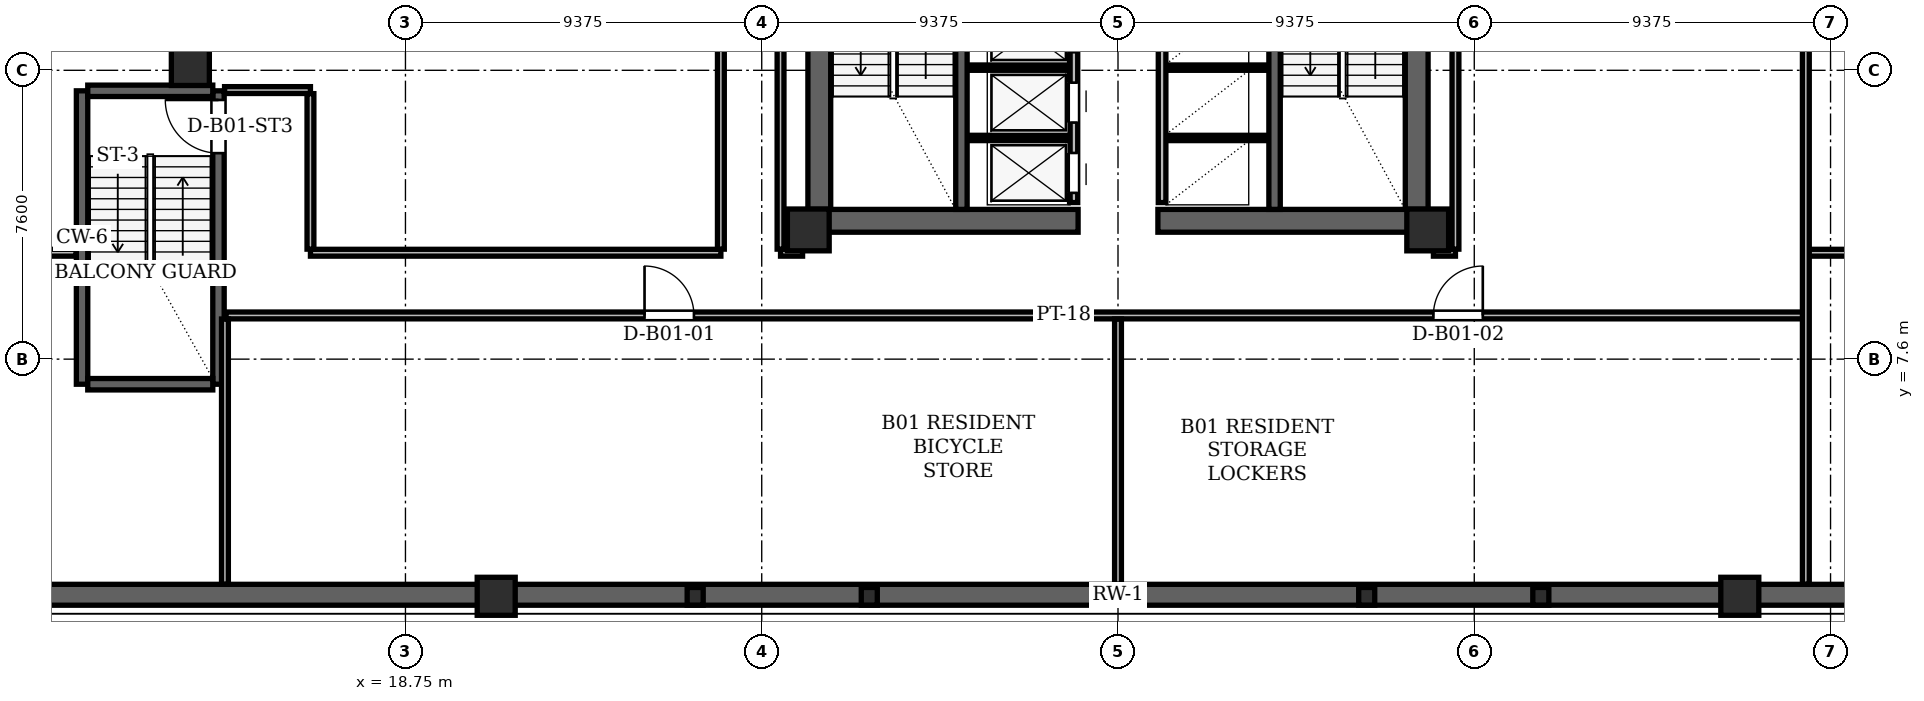
"""IFC4 building model, lengths in metres.
Left out: names, types, materials, properties, quantities, classifications, styles, units other than length and angle.
Written with IfcOpenShell. Run it as: python <this file> out.ifc"""

import sys

from ifc_helpers import new_model, si_unit, direction, frame, frame_2d, origin, origin_2d, place, context, subcontext, project, spatial, rectangle, hollow_rectangle, i_section, extrude, element, fill, save


model = new_model("IFC4")
c1 = context("Model", 3, precision=1e-05, world=origin(), true_north=direction((0.0, 1.0)))
c2 = subcontext(c1, "Body", "Model", "MODEL_VIEW")
j1 = project(units=[si_unit("LENGTHUNIT", "METRE"), si_unit("PLANEANGLEUNIT", "RADIAN")], contexts=[c1])
p1 = place(None, origin())
s1 = spatial("IfcSite", under=j1, at=p1, CompositionType="ELEMENT")
p2 = place(p1, origin())
s2 = spatial("IfcBuilding", under=s1, at=p2, CompositionType="ELEMENT")
p3 = place(p2, frame((0.0, 0.0, -4.0)))
s3 = spatial("IfcBuildingStorey", under=s2, at=p3, CompositionType="ELEMENT", Elevation=-4.0)
for number, where, z_axis, x_axis in (
    (1, (29.35, 11.0, 0.0), (0.0, 0.0, 1.0), (1.0, 0.0, 0.0)),
    (2, (45.65, 11.0, 0.0), (0.0, 0.0, 1.0), (1.0, 0.0, 0.0)),
):
    element("IfcColumn", number, at=place(p3, frame(where, z_axis=z_axis, x_axis=x_axis)), inside=s3, PredefinedType="COLUMN", context=c2, shape_type="SweptSolid", body=[
        extrude(hollow_rectangle(XDim=1.1, YDim=1.1, WallThickness=0.09, at=origin_2d()), origin(), (0.0, 0.0, 1.0), 4.0),
    ])
for number, where, z_axis, x_axis in (
    (3, (13.09, 15.3, 0.004), (0.0, 0.0, 1.0), (1.0, 0.0, 0.0)),
    (4, (21.138, 1.36, 0.004), (0.0, 0.0, 1.0), (1.0, 0.0, 0.0)),
    (5, (53.862, 1.36, 0.004), (0.0, 0.0, 1.0), (1.0, 0.0, 0.0)),
):
    element("IfcColumn", number, at=place(p3, frame(where, z_axis=z_axis, x_axis=x_axis)), inside=s3, PredefinedType="COLUMN", context=c2, shape_type="SweptSolid", body=[
        extrude(hollow_rectangle(XDim=1.0, YDim=1.0, WallThickness=0.085, at=origin_2d()), origin(), (0.0, 0.0, 1.0), 3.991),
    ])
for number, where, z_axis, x_axis in (
    (6, (26.374, 1.36, 0.004), (0.0, 0.0, 1.0), (1.0, 0.0, 0.0)),
    (7, (30.955, 1.36, 0.004), (0.0, 0.0, 1.0), (1.0, 0.0, 0.0)),
    (8, (44.045, 1.36, 0.004), (0.0, 0.0, 1.0), (1.0, 0.0, 0.0)),
    (9, (48.626, 1.36, 0.004), (0.0, 0.0, 1.0), (1.0, 0.0, 0.0)),
):
    element("IfcColumn", number, at=place(p3, frame(where, z_axis=z_axis, x_axis=x_axis)), inside=s3, PredefinedType="COLUMN", context=c2, shape_type="SweptSolid", body=[
        extrude(i_section(OverallWidth=0.422, OverallDepth=0.465, WebThickness=0.045, FlangeThickness=0.072, at=origin_2d()), origin(), (0.0, 0.0, 1.0), 3.991),
    ])
for number, where, z_axis, x_axis in (
    (10, (29.64, 11.0, 0.0), (0.0, 0.0, 1.0), (0.0, 1.0, 0.0)),
    (11, (45.36, 11.0, 0.0), (0.0, 0.0, 1.0), (0.0, 1.0, 0.0)),
):
    element("IfcWall", number, at=place(p3, frame(where, z_axis=z_axis, x_axis=x_axis)), inside=s3, PredefinedType="SHEAR", context=c2, shape_type="SweptSolid", body=[
        extrude(rectangle(XDim=13.3, YDim=0.6, at=frame_2d((6.65, 0.0))), origin(), (0.0, 0.0, 1.0), 3.68),
    ])
for number, where, z_axis, x_axis in (
    (12, (29.35, 11.24, 0.0), (0.0, 0.0, 1.0), (1.0, 0.0, 0.0)),
    (13, (38.55, 11.24, 0.0), (0.0, 0.0, 1.0), (1.0, 0.0, 0.0)),
):
    element("IfcWall", number, at=place(p3, frame(where, z_axis=z_axis, x_axis=x_axis)), inside=s3, PredefinedType="SHEAR", context=c2, shape_type="SweptSolid", body=[
        extrude(rectangle(XDim=7.1, YDim=0.6, at=frame_2d((3.55, 0.0))), origin(), (0.0, 0.0, 1.0), 3.68),
    ])
for number, where, z_axis, x_axis in (
    (14, (33.38, 11.54, 0.0), (0.0, 0.0, 1.0), (0.0, 1.0, 0.0)),
    (15, (41.62, 11.54, 0.0), (0.0, 0.0, 1.0), (0.0, 1.0, 0.0)),
):
    element("IfcWall", number, at=place(p3, frame(where, z_axis=z_axis, x_axis=x_axis)), inside=s3, PredefinedType="SHEAR", context=c2, shape_type="SweptSolid", body=[
        extrude(rectangle(XDim=7.62, YDim=0.3, at=frame_2d((3.81, 0.0))), origin(), (0.0, 0.0, 1.0), 3.68),
    ])
p4 = place(p3, frame((10.24, 6.94, 0.0), z_axis=(0.0, 0.0, 1.0), x_axis=(0.0, 1.0, 0.0)))
e16 = element("IfcWall", 16, at=p4, inside=s3, PredefinedType="SHEAR", context=c2, shape_type="SweptSolid", body=[
    extrude(rectangle(XDim=7.72, YDim=0.3, at=frame_2d((3.86, 0.0))), origin(), (0.0, 0.0, 1.0), 3.68),
])
p5 = place(p3, frame((13.83, 6.94, 0.0), z_axis=(0.0, 0.0, 1.0), x_axis=(0.0, 1.0, 0.0)))
e17 = element("IfcWall", 17, at=p5, inside=s3, PredefinedType="SHEAR", context=c2, shape_type="SweptSolid", body=[
    extrude(rectangle(XDim=7.72, YDim=0.3, at=frame_2d((3.86, 0.0))), origin(), (0.0, 0.0, 1.0), 3.68),
])
p6 = place(p5, frame((6.08, 0.0, 0.0)))
e18 = element("IfcOpeningElement", 18, at=p6, cuts=e17, PredefinedType="OPENING", context=c2, shape_type="SweptSolid", body=[
    extrude(rectangle(XDim=1.4, YDim=2.2, at=frame_2d((0.7, 1.1))), frame((0.0, 0.15, 0.0), z_axis=(0.0, -1.0, 0.0), x_axis=(1.0, 0.0, 0.0)), (0.0, 0.0, 1.0), 0.3),
])
for number, where, z_axis, x_axis in (
    (19, (10.39, 6.94, 0.0), (0.0, 0.0, 1.0), (1.0, 0.0, 0.0)),
    (20, (10.39, 14.66, 0.0), (0.0, 0.0, 1.0), (1.0, 0.0, 0.0)),
):
    element("IfcWall", number, at=place(p3, frame(where, z_axis=z_axis, x_axis=x_axis)), inside=s3, PredefinedType="SHEAR", context=c2, shape_type="SweptSolid", body=[
        extrude(rectangle(XDim=3.29, YDim=0.3, at=frame_2d((1.645, 0.0))), origin(), (0.0, 0.0, 1.0), 3.68),
    ])
p7 = place(p3, frame((-1.093, 1.4, 0.0), z_axis=(0.0, 0.0, 1.0), x_axis=(1.0, 0.0, 0.0)))
e21 = element("IfcWall", 21, at=p7, inside=s3, PredefinedType="USERDEFINED", context=c2, shape_type="SweptSolid", body=[
    extrude(rectangle(XDim=77.186, YDim=0.55, at=frame_2d((38.593, 0.0))), origin(), (0.0, 0.0, 1.0), 3.68),
])
p8 = place(p3, frame((36.34, 11.72, 0.0), z_axis=(0.0, 0.0, 1.0), x_axis=(0.0, 1.0, 0.0)))
e22 = element("IfcWall", 22, at=p8, inside=s3, PredefinedType="PARTITIONING", context=c2, shape_type="SweptSolid", body=[
    extrude(rectangle(XDim=7.6, YDim=0.2, at=frame_2d((3.8, 0.0))), origin(), (0.0, 0.0, 1.0), 3.68),
])
p9 = place(p8, frame((0.255, 0.0, 0.0)))
e23 = element("IfcOpeningElement", 23, at=p9, cuts=e22, PredefinedType="OPENING", context=c2, shape_type="SweptSolid", body=[
    extrude(rectangle(XDim=1.05, YDim=2.15, at=frame_2d((0.525, 1.075))), frame((0.0, 0.1, 0.0), z_axis=(0.0, -1.0, 0.0), x_axis=(1.0, 0.0, 0.0)), (0.0, 0.0, 1.0), 0.2),
])
p10 = place(p8, frame((2.105, 0.0, 0.0)))
e24 = element("IfcOpeningElement", 24, at=p10, cuts=e22, PredefinedType="OPENING", context=c2, shape_type="SweptSolid", body=[
    extrude(rectangle(XDim=1.05, YDim=2.15, at=frame_2d((0.525, 1.075))), frame((0.0, 0.1, 0.0), z_axis=(0.0, -1.0, 0.0), x_axis=(1.0, 0.0, 0.0)), (0.0, 0.0, 1.0), 0.2),
])
p11 = place(p8, frame((3.955, 0.0, 0.0)))
e25 = element("IfcOpeningElement", 25, at=p11, cuts=e22, PredefinedType="OPENING", context=c2, shape_type="SweptSolid", body=[
    extrude(rectangle(XDim=1.05, YDim=2.15, at=frame_2d((0.525, 1.075))), frame((0.0, 0.1, 0.0), z_axis=(0.0, -1.0, 0.0), x_axis=(1.0, 0.0, 0.0)), (0.0, 0.0, 1.0), 0.2),
])
for number, where, z_axis, x_axis in (
    (26, (33.56, 13.42, 0.0), (0.0, 0.0, 1.0), (1.0, 0.0, 0.0)),
    (27, (33.56, 15.27, 0.0), (0.0, 0.0, 1.0), (1.0, 0.0, 0.0)),
):
    element("IfcWall", number, at=place(p3, frame(where, z_axis=z_axis, x_axis=x_axis)), inside=s3, PredefinedType="PARTITIONING", context=c2, shape_type="SweptSolid", body=[
        extrude(rectangle(XDim=2.66, YDim=0.14, at=frame_2d((1.33, 0.0))), origin(), (0.0, 0.0, 1.0), 3.68),
    ])
p12 = place(p3, frame((38.66, 11.72, 0.0), z_axis=(0.0, 0.0, 1.0), x_axis=(0.0, 1.0, 0.0)))
e28 = element("IfcWall", 28, at=p12, inside=s3, PredefinedType="PARTITIONING", context=c2, shape_type="SweptSolid", body=[
    extrude(rectangle(XDim=9.1, YDim=0.2, at=frame_2d((4.55, 0.0))), origin(), (0.0, 0.0, 1.0), 3.68),
])
for number, where, z_axis, x_axis in (
    (29, (38.78, 13.42, 0.0), (0.0, 0.0, 1.0), (1.0, 0.0, 0.0)),
    (30, (38.78, 15.27, 0.0), (0.0, 0.0, 1.0), (1.0, 0.0, 0.0)),
):
    element("IfcWall", number, at=place(p3, frame(where, z_axis=z_axis, x_axis=x_axis)), inside=s3, PredefinedType="PARTITIONING", context=c2, shape_type="SweptSolid", body=[
        extrude(rectangle(XDim=2.66, YDim=0.14, at=frame_2d((1.33, 0.0))), origin(), (0.0, 0.0, 1.0), 3.68),
    ])
p13 = place(p3, frame((14.03, 8.75, 0.0), z_axis=(0.0, 0.0, 1.0), x_axis=(1.0, 0.0, 0.0)))
e31 = element("IfcWall", 31, at=p13, inside=s3, PredefinedType="PARTITIONING", context=c2, shape_type="SweptSolid", body=[
    extrude(rectangle(XDim=41.57, YDim=0.18, at=frame_2d((20.785, 0.0))), origin(), (0.0, 0.0, 1.0), 2.743),
])
p14 = place(p13, frame((11.011, 0.0, 0.0)))
e32 = element("IfcOpeningElement", 32, at=p14, cuts=e31, PredefinedType="OPENING", context=c2, shape_type="SweptSolid", body=[
    extrude(rectangle(XDim=1.3, YDim=2.2, at=frame_2d((0.65, 1.1))), frame((0.0, 0.09, 0.0), z_axis=(0.0, -1.0, 0.0), x_axis=(1.0, 0.0, 0.0)), (0.0, 0.0, 1.0), 0.18),
])
p15 = place(p13, frame((31.769, 0.0, 0.0)))
e33 = element("IfcOpeningElement", 33, at=p15, cuts=e31, PredefinedType="OPENING", context=c2, shape_type="SweptSolid", body=[
    extrude(rectangle(XDim=1.3, YDim=2.2, at=frame_2d((0.65, 1.1))), frame((0.0, 0.09, 0.0), z_axis=(0.0, -1.0, 0.0), x_axis=(1.0, 0.0, 0.0)), (0.0, 0.0, 1.0), 0.18),
])
p16 = place(p3, frame((-2.721, 10.4, 0.0), z_axis=(0.0, 0.0, 1.0), x_axis=(1.0, 0.0, 0.0)))
e34 = element("IfcWall", 34, at=p16, inside=s3, PredefinedType="PARTITIONING", context=c2, shape_type="SweptSolid", body=[
    extrude(rectangle(XDim=12.801, YDim=0.18, at=frame_2d((6.4, 0.0))), origin(), (0.0, 0.0, 1.0), 2.743),
])
p17 = place(p3, frame((16.25, 10.4, 0.0), z_axis=(0.0, 0.0, 1.0), x_axis=(1.0, 0.0, 0.0)))
e35 = element("IfcWall", 35, at=p17, inside=s3, PredefinedType="PARTITIONING", context=c2, shape_type="SweptSolid", body=[
    extrude(rectangle(XDim=10.8, YDim=0.18, at=frame_2d((5.4, 0.0))), origin(), (0.0, 0.0, 1.0), 3.68),
])
for number, where, z_axis, x_axis in (
    (36, (28.62, 10.4, 0.0), (0.0, 0.0, 1.0), (1.0, 0.0, 0.0)),
    (37, (45.8, 10.4, 0.0), (0.0, 0.0, 1.0), (1.0, 0.0, 0.0)),
):
    element("IfcWall", number, at=place(p3, frame(where, z_axis=z_axis, x_axis=x_axis)), inside=s3, PredefinedType="PARTITIONING", context=c2, shape_type="SweptSolid", body=[
        extrude(rectangle(XDim=0.58, YDim=0.18, at=frame_2d((0.29, 0.0))), origin(), (0.0, 0.0, 1.0), 2.743),
    ])
p18 = place(p3, frame((55.6, 10.4, 0.0), z_axis=(0.0, 0.0, 1.0), x_axis=(1.0, 0.0, 0.0)))
e38 = element("IfcWall", 38, at=p18, inside=s3, PredefinedType="PARTITIONING", context=c2, shape_type="SweptSolid", body=[
    extrude(rectangle(XDim=22.121, YDim=0.18, at=frame_2d((11.061, 0.0))), origin(), (0.0, 0.0, 1.0), 2.743),
])
p19 = place(p3, frame((13.99, 14.68, 0.0), z_axis=(0.0, 0.0, 1.0), x_axis=(1.0, 0.0, 0.0)))
e39 = element("IfcWall", 39, at=p19, inside=s3, PredefinedType="PARTITIONING", context=c2, shape_type="SweptSolid", body=[
    extrude(rectangle(XDim=2.26, YDim=0.18, at=frame_2d((1.13, 0.0))), origin(), (0.0, 0.0, 1.0), 2.743),
])
p20 = place(p3, frame((14.0, 1.679, 0.0), z_axis=(0.0, 0.0, 1.0), x_axis=(0.0, 1.0, 0.0)))
e40 = element("IfcWall", 40, at=p20, inside=s3, PredefinedType="PARTITIONING", context=c2, shape_type="SweptSolid", body=[
    extrude(rectangle(XDim=6.977, YDim=0.18, at=frame_2d((3.489, 0.0))), origin(), (0.0, 0.0, 1.0), 3.68),
])
p21 = place(p3, frame((16.25, 10.494, 0.0), z_axis=(0.0, 0.0, 1.0), x_axis=(0.0, 1.0, 0.0)))
e41 = element("IfcWall", 41, at=p21, inside=s3, PredefinedType="PARTITIONING", context=c2, shape_type="SweptSolid", body=[
    extrude(rectangle(XDim=4.092, YDim=0.18, at=frame_2d((2.046, 0.0))), origin(), (0.0, 0.0, 1.0), 2.743),
])
p22 = place(p3, frame((27.05, 10.494, 0.0), z_axis=(0.0, 0.0, 1.0), x_axis=(0.0, 1.0, 0.0)))
e42 = element("IfcWall", 42, at=p22, inside=s3, PredefinedType="PARTITIONING", context=c2, shape_type="SweptSolid", body=[
    extrude(rectangle(XDim=28.386, YDim=0.18, at=frame_2d((14.193, 0.0))), origin(), (0.0, 0.0, 1.0), 2.743),
])
p23 = place(p22, frame((5.91, 0.0, 0.0)))
e43 = element("IfcOpeningElement", 43, at=p23, cuts=e42, PredefinedType="OPENING", context=c2, shape_type="SweptSolid", body=[
    extrude(rectangle(XDim=1.45, YDim=2.25, at=frame_2d((0.725, 1.125))), frame((0.0, 0.09, 0.0), z_axis=(0.0, -1.0, 0.0), x_axis=(1.0, 0.0, 0.0)), (0.0, 0.0, 1.0), 0.18),
])
p24 = place(p3, frame((28.62, 10.494, 0.0), z_axis=(0.0, 0.0, 1.0), x_axis=(0.0, 1.0, 0.0)))
e44 = element("IfcWall", 44, at=p24, inside=s3, PredefinedType="PARTITIONING", context=c2, shape_type="SweptSolid", body=[
    extrude(rectangle(XDim=14.162, YDim=0.18, at=frame_2d((7.081, 0.0))), origin(), (0.0, 0.0, 1.0), 2.743),
])
p25 = place(p3, frame((37.5, 1.679, 0.0), z_axis=(0.0, 0.0, 1.0), x_axis=(0.0, 1.0, 0.0)))
e45 = element("IfcWall", 45, at=p25, inside=s3, PredefinedType="PARTITIONING", context=c2, shape_type="SweptSolid", body=[
    extrude(rectangle(XDim=6.977, YDim=0.18, at=frame_2d((3.489, 0.0))), origin(), (0.0, 0.0, 1.0), 3.68),
])
p26 = place(p3, frame((46.38, 10.494, 0.0), z_axis=(0.0, 0.0, 1.0), x_axis=(0.0, 1.0, 0.0)))
e46 = element("IfcWall", 46, at=p26, inside=s3, PredefinedType="PARTITIONING", context=c2, shape_type="SweptSolid", body=[
    extrude(rectangle(XDim=14.162, YDim=0.18, at=frame_2d((7.081, 0.0))), origin(), (0.0, 0.0, 1.0), 2.743),
])
p27 = place(p3, frame((55.6, 1.679, 0.0), z_axis=(0.0, 0.0, 1.0), x_axis=(0.0, 1.0, 0.0)))
e47 = element("IfcWall", 47, at=p27, inside=s3, PredefinedType="PARTITIONING", context=c2, shape_type="SweptSolid", body=[
    extrude(rectangle(XDim=42.242, YDim=0.18, at=frame_2d((21.121, 0.0))), origin(), (0.0, 0.0, 1.0), 2.47),
])
p28 = place(p27, frame((14.725, 0.0, 0.0)))
e48 = element("IfcOpeningElement", 48, at=p28, cuts=e47, PredefinedType="OPENING", context=c2, shape_type="SweptSolid", body=[
    extrude(rectangle(XDim=1.45, YDim=2.25, at=frame_2d((0.725, 1.125))), frame((0.0, 0.09, 0.0), z_axis=(0.0, -1.0, 0.0), x_axis=(1.0, 0.0, 0.0)), (0.0, 0.0, 1.0), 0.18),
])
p29 = place(p9, origin())
e49 = element("IfcDoor", 49, at=p29, inside=s3, OperationType="SLIDING_TO_LEFT", PredefinedType="DOOR", context=c2, shape_type="SweptSolid", body=[
    extrude(rectangle(XDim=1.05, YDim=2.15, at=frame_2d((0.525, 1.075))), frame((0.0, 0.025, 0.0), z_axis=(0.0, -1.0, 0.0), x_axis=(1.0, 0.0, 0.0)), (0.0, 0.0, 1.0), 0.05),
])
fill(e23, e49)
p30 = place(p10, origin())
e50 = element("IfcDoor", 50, at=p30, inside=s3, OperationType="SLIDING_TO_RIGHT", PredefinedType="DOOR", context=c2, shape_type="SweptSolid", body=[
    extrude(rectangle(XDim=1.05, YDim=2.15, at=frame_2d((0.525, 1.075))), frame((0.0, 0.025, 0.0), z_axis=(0.0, -1.0, 0.0), x_axis=(1.0, 0.0, 0.0)), (0.0, 0.0, 1.0), 0.05),
])
fill(e24, e50)
p31 = place(p11, origin())
e51 = element("IfcDoor", 51, at=p31, inside=s3, OperationType="SLIDING_TO_LEFT", PredefinedType="DOOR", context=c2, shape_type="SweptSolid", body=[
    extrude(rectangle(XDim=1.05, YDim=2.15, at=frame_2d((0.525, 1.075))), frame((0.0, 0.025, 0.0), z_axis=(0.0, -1.0, 0.0), x_axis=(1.0, 0.0, 0.0)), (0.0, 0.0, 1.0), 0.05),
])
fill(e25, e51)
p32 = place(p6, origin())
e52 = element("IfcDoor", 52, at=p32, inside=s3, OperationType="SINGLE_SWING_RIGHT", PredefinedType="DOOR", context=c2, shape_type="SweptSolid", body=[
    extrude(rectangle(XDim=1.4, YDim=2.2, at=frame_2d((0.7, 1.1))), frame((0.0, 0.025, 0.0), z_axis=(0.0, -1.0, 0.0), x_axis=(1.0, 0.0, 0.0)), (0.0, 0.0, 1.0), 0.05),
])
fill(e18, e52)
p33 = place(p14, origin())
e53 = element("IfcDoor", 53, at=p33, inside=s3, OperationType="SINGLE_SWING_LEFT", PredefinedType="DOOR", context=c2, shape_type="SweptSolid", body=[
    extrude(rectangle(XDim=1.3, YDim=2.2, at=frame_2d((0.65, 1.1))), frame((0.0, 0.025, 0.0), z_axis=(0.0, -1.0, 0.0), x_axis=(1.0, 0.0, 0.0)), (0.0, 0.0, 1.0), 0.05),
])
fill(e32, e53)
p34 = place(p15, origin())
e54 = element("IfcDoor", 54, at=p34, inside=s3, OperationType="SINGLE_SWING_RIGHT", PredefinedType="DOOR", context=c2, shape_type="SweptSolid", body=[
    extrude(rectangle(XDim=1.3, YDim=2.2, at=frame_2d((0.65, 1.1))), frame((0.0, 0.025, 0.0), z_axis=(0.0, -1.0, 0.0), x_axis=(1.0, 0.0, 0.0)), (0.0, 0.0, 1.0), 0.05),
])
fill(e33, e54)
save(model, sys.argv[1])
